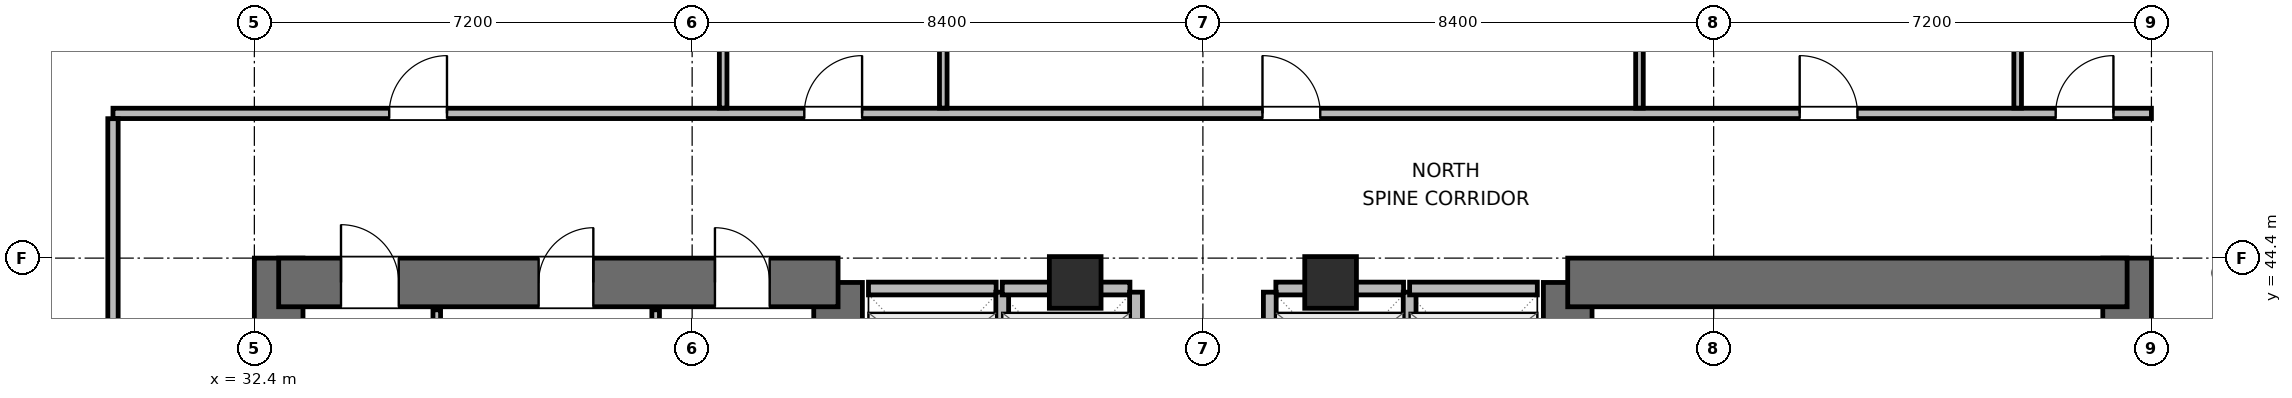
"""IFC4 building model, lengths in metres.
Left out: names, types, materials, properties, quantities, classifications, styles, units other than length and angle.
Written with IfcOpenShell. Run it as: python <this file> out.ifc"""

import sys

from ifc_helpers import new_model, si_unit, direction, frame, frame_2d, origin, origin_2d, place, context, subcontext, project, spatial, rectangle, extrude, element, fill, save


model = new_model("IFC4")
c1 = context("Model", 3, precision=1e-05, world=origin(), true_north=direction((0.0, 1.0)))
c2 = subcontext(c1, "Body", "Model", "MODEL_VIEW")
j1 = project(units=[si_unit("LENGTHUNIT", "METRE"), si_unit("PLANEANGLEUNIT", "RADIAN")], contexts=[c1])
p1 = place(None, origin())
s1 = spatial("IfcSite", under=j1, at=p1, CompositionType="ELEMENT")
p2 = place(p1, origin())
s2 = spatial("IfcBuilding", under=s1, at=p2, CompositionType="ELEMENT")
p3 = place(p2, frame((0.0, 0.0, 150.6)))
s3 = spatial("IfcBuildingStorey", under=s2, at=p3, CompositionType="ELEMENT", Elevation=150.6)
p4 = place(p3, frame((32.8, 27.6, 0.0), z_axis=(0.0, 0.0, 1.0), x_axis=(0.0, 1.0, 0.0)))
e1 = element("IfcWall", 1, at=p4, inside=s3, PredefinedType="SHEAR", context=c2, shape_type="SweptSolid", body=[
    extrude(rectangle(XDim=16.8, YDim=0.8, at=frame_2d((8.4, 0.0))), origin(), (0.0, 0.0, 1.0), 3.9),
])
p5 = place(p3, frame((42.0, 37.8, 0.0), z_axis=(0.0, 0.0, 1.0), x_axis=(0.0, 1.0, 0.0)))
e2 = element("IfcWall", 2, at=p5, inside=s3, PredefinedType="SHEAR", context=c2, shape_type="SweptSolid", body=[
    extrude(rectangle(XDim=6.2, YDim=0.8, at=frame_2d((3.1, 0.0))), origin(), (0.0, 0.0, 1.0), 3.9),
])
p6 = place(p3, frame((32.8, 44.0, 0.0), z_axis=(0.0, 0.0, 1.0), x_axis=(1.0, 0.0, 0.0)))
e3 = element("IfcWall", 3, at=p6, inside=s3, PredefinedType="SHEAR", context=c2, shape_type="SweptSolid", body=[
    extrude(rectangle(XDim=9.2, YDim=0.8, at=frame_2d((4.6, 0.0))), origin(), (0.0, 0.0, 1.0), 3.9),
])
p7 = place(p6, frame((1.025, 0.0, 0.0)))
e4 = element("IfcOpeningElement", 4, at=p7, cuts=e3, PredefinedType="OPENING", context=c2, shape_type="SweptSolid", body=[
    extrude(rectangle(XDim=0.95, YDim=2.04, at=frame_2d((0.475, 1.02))), frame((0.0, 0.41, 0.0), z_axis=(0.0, -1.0, 0.0), x_axis=(1.0, 0.0, 0.0)), (0.0, 0.0, 1.0), 0.82),
])
p8 = place(p6, frame((4.275, 0.0, 0.0)))
e5 = element("IfcOpeningElement", 5, at=p8, cuts=e3, PredefinedType="OPENING", context=c2, shape_type="SweptSolid", body=[
    extrude(rectangle(XDim=0.9, YDim=2.02, at=frame_2d((0.45, 1.01))), frame((0.0, 0.41, 0.0), z_axis=(0.0, -1.0, 0.0), x_axis=(1.0, 0.0, 0.0)), (0.0, 0.0, 1.0), 0.82),
])
p9 = place(p6, frame((7.175, 0.0, 0.0)))
e6 = element("IfcOpeningElement", 6, at=p9, cuts=e3, PredefinedType="OPENING", context=c2, shape_type="SweptSolid", body=[
    extrude(rectangle(XDim=0.9, YDim=2.02, at=frame_2d((0.45, 1.01))), frame((0.0, 0.41, 0.0), z_axis=(0.0, -1.0, 0.0), x_axis=(1.0, 0.0, 0.0)), (0.0, 0.0, 1.0), 0.82),
])
p10 = place(p3, frame((54.0, 38.0, 0.0), z_axis=(0.0, 0.0, 1.0), x_axis=(0.0, 1.0, 0.0)))
e7 = element("IfcWall", 7, at=p10, inside=s3, PredefinedType="SHEAR", context=c2, shape_type="SweptSolid", body=[
    extrude(rectangle(XDim=6.0, YDim=0.8, at=frame_2d((3.0, 0.0))), origin(), (0.0, 0.0, 1.0), 3.9),
])
p11 = place(p3, frame((63.2, 27.6, 0.0), z_axis=(0.0, 0.0, 1.0), x_axis=(0.0, 1.0, 0.0)))
e8 = element("IfcWall", 8, at=p11, inside=s3, PredefinedType="SHEAR", context=c2, shape_type="SweptSolid", body=[
    extrude(rectangle(XDim=16.8, YDim=0.8, at=frame_2d((8.4, 0.0))), origin(), (0.0, 0.0, 1.0), 3.9),
])
p12 = place(p3, frame((54.0, 44.0, 0.0), z_axis=(0.0, 0.0, 1.0), x_axis=(1.0, 0.0, 0.0)))
e9 = element("IfcWall", 9, at=p12, inside=s3, PredefinedType="SHEAR", context=c2, shape_type="SweptSolid", body=[
    extrude(rectangle(XDim=9.2, YDim=0.8, at=frame_2d((4.6, 0.0))), origin(), (0.0, 0.0, 1.0), 3.9),
])
for number, where, z_axis, x_axis in (
    (10, (45.9, 44.0, 0.0), (0.0, 0.0, 1.0), (1.0, 0.0, 0.0)),
    (11, (50.1, 44.0, 0.0), (0.0, 0.0, 1.0), (1.0, 0.0, 0.0)),
):
    element("IfcColumn", number, at=place(p3, frame(where, z_axis=z_axis, x_axis=x_axis)), inside=s3, PredefinedType="COLUMN", context=c2, shape_type="SweptSolid", body=[
        extrude(rectangle(XDim=0.85, YDim=0.85, at=origin_2d()), origin(), (0.0, 0.0, 1.0), 3.9),
    ])
for number, where, z_axis, x_axis in (
    (12, (35.4, 41.095, 0.0), (0.0, 0.0, 1.0), (0.0, 1.0, 0.0)),
    (13, (39.0, 41.095, 0.0), (0.0, 0.0, 1.0), (0.0, 1.0, 0.0)),
):
    element("IfcWall", number, at=place(p3, frame(where, z_axis=z_axis, x_axis=x_axis)), inside=s3, PredefinedType="PARTITIONING", context=c2, shape_type="SweptSolid", body=[
        extrude(rectangle(XDim=2.455, YDim=0.125, at=frame_2d((1.228, 0.0))), origin(), (0.0, 0.0, 1.0), 3.68),
    ])
p13 = place(p3, frame((42.5, 43.9, 0.0), z_axis=(0.0, 0.0, 1.0), x_axis=(1.0, 0.0, 0.0)))
e14 = element("IfcWall", 14, at=p13, inside=s3, PredefinedType="PARTITIONING", context=c2, shape_type="SweptSolid", body=[
    extrude(rectangle(XDim=2.1, YDim=0.21, at=frame_2d((1.05, 0.0))), origin(), (0.0, 0.0, 1.0), 2.565),
])
p14 = place(p3, frame((44.7, 41.56, 0.0), z_axis=(0.0, 0.0, 1.0), x_axis=(0.0, 1.0, 0.0)))
e15 = element("IfcWall", 15, at=p14, inside=s3, PredefinedType="PARTITIONING", context=c2, shape_type="SweptSolid", body=[
    extrude(rectangle(XDim=2.28, YDim=0.21, at=frame_2d((1.14, 0.0))), origin(), (0.0, 0.0, 1.0), 3.68),
])
p15 = place(p3, frame((44.7, 43.9, 0.0), z_axis=(0.0, 0.0, 1.0), x_axis=(1.0, 0.0, 0.0)))
e16 = element("IfcWall", 16, at=p15, inside=s3, PredefinedType="PARTITIONING", context=c2, shape_type="SweptSolid", body=[
    extrude(rectangle(XDim=2.1, YDim=0.21, at=frame_2d((1.05, 0.0))), origin(), (0.0, 0.0, 1.0), 2.565),
])
p16 = place(p3, frame((46.9, 41.56, 0.0), z_axis=(0.0, 0.0, 1.0), x_axis=(0.0, 1.0, 0.0)))
e17 = element("IfcWall", 17, at=p16, inside=s3, PredefinedType="PARTITIONING", context=c2, shape_type="SweptSolid", body=[
    extrude(rectangle(XDim=2.28, YDim=0.21, at=frame_2d((1.14, 0.0))), origin(), (0.0, 0.0, 1.0), 3.68),
])
p17 = place(p3, frame((49.2, 43.9, 0.0), z_axis=(0.0, 0.0, 1.0), x_axis=(1.0, 0.0, 0.0)))
e18 = element("IfcWall", 18, at=p17, inside=s3, PredefinedType="PARTITIONING", context=c2, shape_type="SweptSolid", body=[
    extrude(rectangle(XDim=2.1, YDim=0.21, at=frame_2d((1.05, 0.0))), origin(), (0.0, 0.0, 1.0), 2.565),
])
for number, where, z_axis, x_axis in (
    (19, (49.1, 41.56, 0.0), (0.0, 0.0, 1.0), (0.0, 1.0, 0.0)),
    (20, (51.4, 41.56, 0.0), (0.0, 0.0, 1.0), (0.0, 1.0, 0.0)),
):
    element("IfcWall", number, at=place(p3, frame(where, z_axis=z_axis, x_axis=x_axis)), inside=s3, PredefinedType="PARTITIONING", context=c2, shape_type="SweptSolid", body=[
        extrude(rectangle(XDim=2.28, YDim=0.21, at=frame_2d((1.14, 0.0))), origin(), (0.0, 0.0, 1.0), 3.68),
    ])
p18 = place(p3, frame((51.4, 43.9, 0.0), z_axis=(0.0, 0.0, 1.0), x_axis=(1.0, 0.0, 0.0)))
e21 = element("IfcWall", 21, at=p18, inside=s3, PredefinedType="PARTITIONING", context=c2, shape_type="SweptSolid", body=[
    extrude(rectangle(XDim=2.1, YDim=0.21, at=frame_2d((1.05, 0.0))), origin(), (0.0, 0.0, 1.0), 2.565),
])
p19 = place(p3, frame((30.075, 46.78, 0.0), z_axis=(0.0, 0.0, 1.0), x_axis=(1.0, 0.0, 0.0)))
e22 = element("IfcWall", 22, at=p19, inside=s3, PredefinedType="PARTITIONING", context=c2, shape_type="SweptSolid", body=[
    extrude(rectangle(XDim=33.525, YDim=0.17, at=frame_2d((16.763, 0.0))), origin(), (0.0, 0.0, 1.0), 3.68),
])
p20 = place(p19, frame((4.543, 0.0, 0.0)))
e23 = element("IfcOpeningElement", 23, at=p20, cuts=e22, PredefinedType="OPENING", context=c2, shape_type="SweptSolid", body=[
    extrude(rectangle(XDim=0.95, YDim=2.04, at=frame_2d((0.475, 1.02))), frame((0.0, 0.095, 0.0), z_axis=(0.0, -1.0, 0.0), x_axis=(1.0, 0.0, 0.0)), (0.0, 0.0, 1.0), 0.19),
])
p21 = place(p19, frame((11.37, 0.0, 0.0)))
e24 = element("IfcOpeningElement", 24, at=p21, cuts=e22, PredefinedType="OPENING", context=c2, shape_type="SweptSolid", body=[
    extrude(rectangle(XDim=0.95, YDim=2.04, at=frame_2d((0.475, 1.02))), frame((0.0, 0.095, 0.0), z_axis=(0.0, -1.0, 0.0), x_axis=(1.0, 0.0, 0.0)), (0.0, 0.0, 1.0), 0.19),
])
p22 = place(p19, frame((18.905, 0.0, 0.0)))
e25 = element("IfcOpeningElement", 25, at=p22, cuts=e22, PredefinedType="OPENING", context=c2, shape_type="SweptSolid", body=[
    extrude(rectangle(XDim=0.95, YDim=2.04, at=frame_2d((0.475, 1.02))), frame((0.0, 0.095, 0.0), z_axis=(0.0, -1.0, 0.0), x_axis=(1.0, 0.0, 0.0)), (0.0, 0.0, 1.0), 0.19),
])
p23 = place(p19, frame((27.74, 0.0, 0.0)))
e26 = element("IfcOpeningElement", 26, at=p23, cuts=e22, PredefinedType="OPENING", context=c2, shape_type="SweptSolid", body=[
    extrude(rectangle(XDim=0.95, YDim=2.04, at=frame_2d((0.475, 1.02))), frame((0.0, 0.095, 0.0), z_axis=(0.0, -1.0, 0.0), x_axis=(1.0, 0.0, 0.0)), (0.0, 0.0, 1.0), 0.19),
])
p24 = place(p19, frame((31.95, 0.0, 0.0)))
e27 = element("IfcOpeningElement", 27, at=p24, cuts=e22, PredefinedType="OPENING", context=c2, shape_type="SweptSolid", body=[
    extrude(rectangle(XDim=0.95, YDim=2.04, at=frame_2d((0.475, 1.02))), frame((0.0, 0.095, 0.0), z_axis=(0.0, -1.0, 0.0), x_axis=(1.0, 0.0, 0.0)), (0.0, 0.0, 1.0), 0.19),
])
p25 = place(p3, frame((30.075, 37.1, 0.0), z_axis=(0.0, 0.0, 1.0), x_axis=(0.0, 1.0, 0.0)))
e28 = element("IfcWall", 28, at=p25, inside=s3, PredefinedType="PARTITIONING", context=c2, shape_type="SweptSolid", body=[
    extrude(rectangle(XDim=9.593, YDim=0.17, at=frame_2d((4.796, 0.0))), origin(), (0.0, 0.0, 1.0), 3.68),
])
p26 = place(p25, frame((4.365, 0.0, 0.0)))
e29 = element("IfcOpeningElement", 29, at=p26, cuts=e28, PredefinedType="OPENING", context=c2, shape_type="SweptSolid", body=[
    extrude(rectangle(XDim=0.95, YDim=2.04, at=frame_2d((0.475, 1.02))), frame((0.0, 0.095, 0.0), z_axis=(0.0, -1.0, 0.0), x_axis=(1.0, 0.0, 0.0)), (0.0, 0.0, 1.0), 0.19),
])
p27 = place(p3, frame((40.11, 46.867, 0.0), z_axis=(0.0, 0.0, 1.0), x_axis=(0.0, 1.0, 0.0)))
e30 = element("IfcWall", 30, at=p27, inside=s3, PredefinedType="PARTITIONING", context=c2, shape_type="SweptSolid", body=[
    extrude(rectangle(XDim=15.298, YDim=0.125, at=frame_2d((7.649, 0.0))), origin(), (0.0, 0.0, 1.0), 3.043),
])
p28 = place(p3, frame((43.73, 46.867, 0.0), z_axis=(0.0, 0.0, 1.0), x_axis=(0.0, 1.0, 0.0)))
e31 = element("IfcWall", 31, at=p28, inside=s3, PredefinedType="PARTITIONING", context=c2, shape_type="SweptSolid", body=[
    extrude(rectangle(XDim=13.766, YDim=0.125, at=frame_2d((6.883, 0.0))), origin(), (0.0, 0.0, 1.0), 3.043),
])
p29 = place(p3, frame((55.18, 46.867, 0.0), z_axis=(0.0, 0.0, 1.0), x_axis=(0.0, 1.0, 0.0)))
e32 = element("IfcWall", 32, at=p29, inside=s3, PredefinedType="PARTITIONING", context=c2, shape_type="SweptSolid", body=[
    extrude(rectangle(XDim=15.258, YDim=0.125, at=frame_2d((7.629, 0.0))), origin(), (0.0, 0.0, 1.0), 3.043),
])
p30 = place(p3, frame((61.4, 46.867, 0.0), z_axis=(0.0, 0.0, 1.0), x_axis=(0.0, 1.0, 0.0)))
e33 = element("IfcWall", 33, at=p30, inside=s3, PredefinedType="PARTITIONING", context=c2, shape_type="SweptSolid", body=[
    extrude(rectangle(XDim=15.258, YDim=0.125, at=frame_2d((7.629, 0.0))), origin(), (0.0, 0.0, 1.0), 3.68),
])
p31 = place(p7, origin())
e34 = element("IfcDoor", 34, at=p31, inside=s3, OperationType="SINGLE_SWING_LEFT", PredefinedType="DOOR", context=c2, shape_type="SweptSolid", body=[
    extrude(rectangle(XDim=0.95, YDim=2.04, at=frame_2d((0.475, 1.02))), frame((0.0, 0.025, 0.0), z_axis=(0.0, -1.0, 0.0), x_axis=(1.0, 0.0, 0.0)), (0.0, 0.0, 1.0), 0.05),
])
fill(e4, e34)
p32 = place(p8, origin())
e35 = element("IfcDoor", 35, at=p32, inside=s3, OperationType="SINGLE_SWING_RIGHT", PredefinedType="DOOR", context=c2, shape_type="SweptSolid", body=[
    extrude(rectangle(XDim=0.9, YDim=2.02, at=frame_2d((0.45, 1.01))), frame((0.0, 0.025, 0.0), z_axis=(0.0, -1.0, 0.0), x_axis=(1.0, 0.0, 0.0)), (0.0, 0.0, 1.0), 0.05),
])
fill(e5, e35)
p33 = place(p9, origin())
e36 = element("IfcDoor", 36, at=p33, inside=s3, OperationType="SINGLE_SWING_LEFT", PredefinedType="DOOR", context=c2, shape_type="SweptSolid", body=[
    extrude(rectangle(XDim=0.9, YDim=2.02, at=frame_2d((0.45, 1.01))), frame((0.0, 0.025, 0.0), z_axis=(0.0, -1.0, 0.0), x_axis=(1.0, 0.0, 0.0)), (0.0, 0.0, 1.0), 0.05),
])
fill(e6, e36)
p34 = place(p20, origin())
e37 = element("IfcDoor", 37, at=p34, inside=s3, OperationType="SINGLE_SWING_RIGHT", PredefinedType="DOOR", context=c2, shape_type="SweptSolid", body=[
    extrude(rectangle(XDim=0.95, YDim=2.04, at=frame_2d((0.475, 1.02))), frame((0.0, 0.025, 0.0), z_axis=(0.0, -1.0, 0.0), x_axis=(1.0, 0.0, 0.0)), (0.0, 0.0, 1.0), 0.05),
])
fill(e23, e37)
p35 = place(p21, origin())
e38 = element("IfcDoor", 38, at=p35, inside=s3, OperationType="SINGLE_SWING_RIGHT", PredefinedType="DOOR", context=c2, shape_type="SweptSolid", body=[
    extrude(rectangle(XDim=0.95, YDim=2.04, at=frame_2d((0.475, 1.02))), frame((0.0, 0.025, 0.0), z_axis=(0.0, -1.0, 0.0), x_axis=(1.0, 0.0, 0.0)), (0.0, 0.0, 1.0), 0.05),
])
fill(e24, e38)
p36 = place(p22, origin())
e39 = element("IfcDoor", 39, at=p36, inside=s3, OperationType="SINGLE_SWING_LEFT", PredefinedType="DOOR", context=c2, shape_type="SweptSolid", body=[
    extrude(rectangle(XDim=0.95, YDim=2.04, at=frame_2d((0.475, 1.02))), frame((0.0, 0.025, 0.0), z_axis=(0.0, -1.0, 0.0), x_axis=(1.0, 0.0, 0.0)), (0.0, 0.0, 1.0), 0.05),
])
fill(e25, e39)
p37 = place(p23, origin())
e40 = element("IfcDoor", 40, at=p37, inside=s3, OperationType="SINGLE_SWING_LEFT", PredefinedType="DOOR", context=c2, shape_type="SweptSolid", body=[
    extrude(rectangle(XDim=0.95, YDim=2.04, at=frame_2d((0.475, 1.02))), frame((0.0, 0.025, 0.0), z_axis=(0.0, -1.0, 0.0), x_axis=(1.0, 0.0, 0.0)), (0.0, 0.0, 1.0), 0.05),
])
fill(e26, e40)
p38 = place(p24, origin())
e41 = element("IfcDoor", 41, at=p38, inside=s3, OperationType="SINGLE_SWING_RIGHT", PredefinedType="DOOR", context=c2, shape_type="SweptSolid", body=[
    extrude(rectangle(XDim=0.95, YDim=2.04, at=frame_2d((0.475, 1.02))), frame((0.0, 0.025, 0.0), z_axis=(0.0, -1.0, 0.0), x_axis=(1.0, 0.0, 0.0)), (0.0, 0.0, 1.0), 0.05),
])
fill(e27, e41)
save(model, sys.argv[1])
